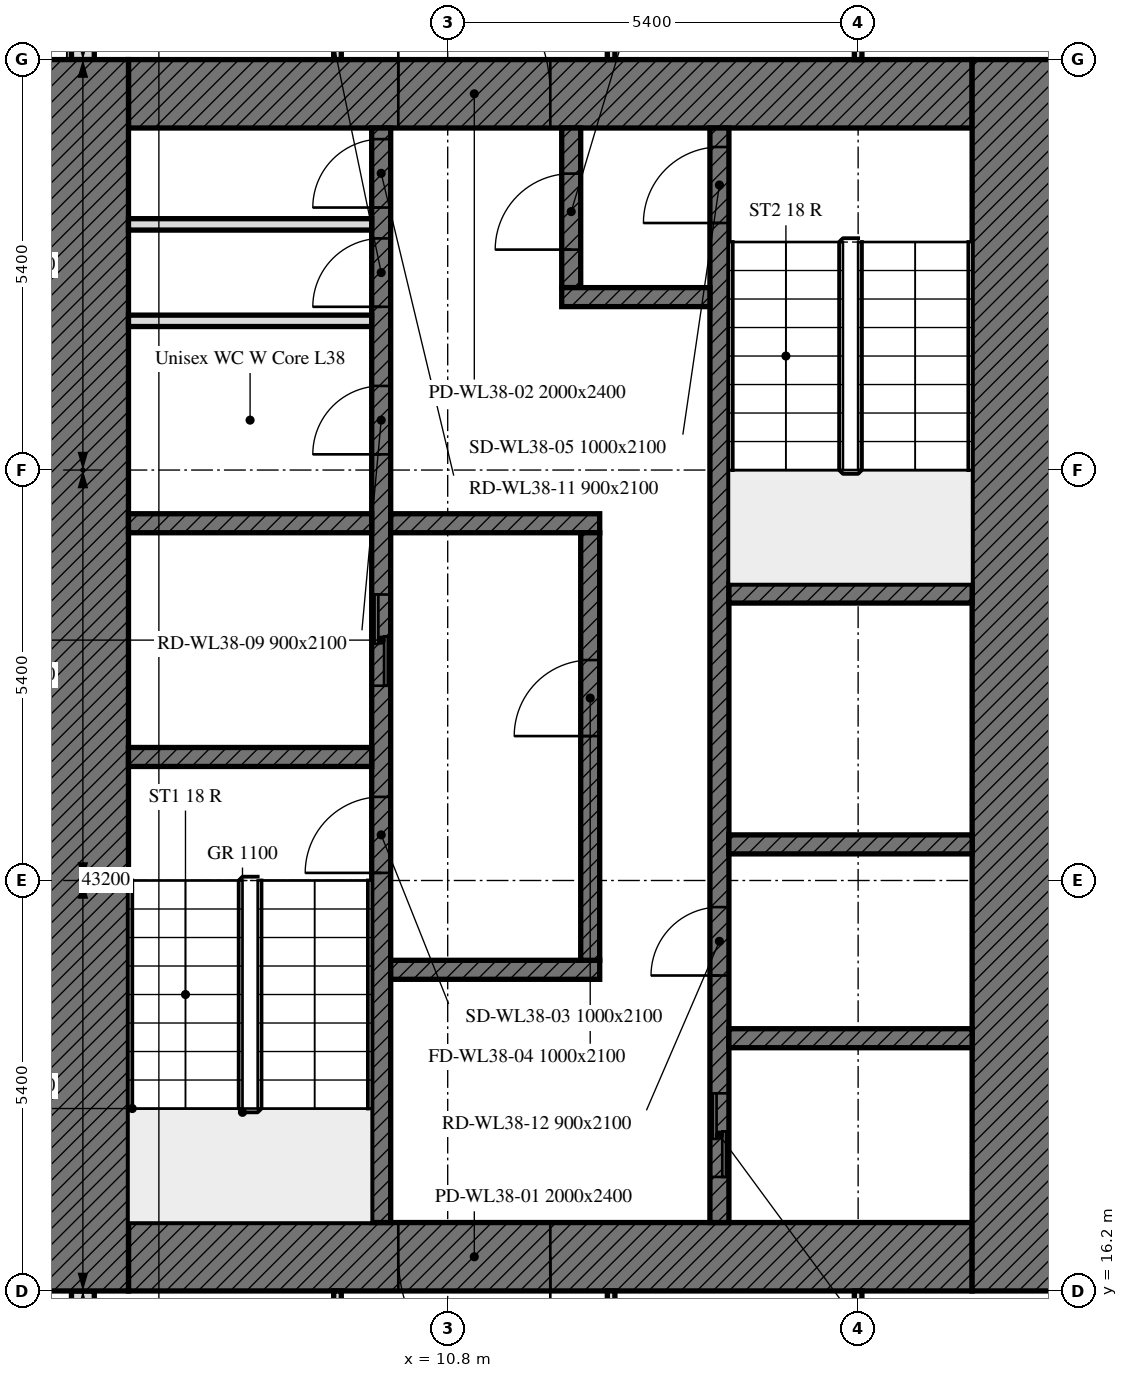
"""IFC4 building model, lengths in metres.
Left out: names, types, materials, properties, quantities, classifications, styles, units other than length and angle.
Written with IfcOpenShell. Run it as: python <this file> out.ifc"""

import sys

from ifc_helpers import new_model, si_unit, direction, frame, frame_2d, origin, place, context, subcontext, project, spatial, rectangle, extrude, element, fill, save


model = new_model("IFC4")
c1 = context("Model", 3, precision=1e-05, world=origin(), true_north=direction((0.0, 1.0)))
c2 = subcontext(c1, "Body", "Model", "MODEL_VIEW")
j1 = project(units=[si_unit("LENGTHUNIT", "METRE"), si_unit("PLANEANGLEUNIT", "RADIAN")], contexts=[c1])
p1 = place(None, origin())
s1 = spatial("IfcSite", under=j1, at=p1, CompositionType="ELEMENT")
p2 = place(p1, origin())
s2 = spatial("IfcBuilding", under=s1, at=p2, CompositionType="ELEMENT")
p3 = place(p2, frame((0.0, 0.0, 162.7)))
s3 = spatial("IfcBuildingStorey", under=s2, at=p3, CompositionType="ELEMENT", Elevation=162.7)
p4 = place(p3, frame((6.0, 37.614, 0.0), z_axis=(0.0, 0.0, 1.0), x_axis=(0.0, -1.0, 0.0)))
e1 = element("IfcWall", 1, at=p4, inside=s3, PredefinedType="SOLIDWALL", context=c2, shape_type="SweptSolid", body=[
    extrude(rectangle(XDim=5.214, YDim=0.3, at=frame_2d((2.607, 0.0))), origin(), (0.0, 0.0, 1.0), 3.0),
])
p5 = place(p4, frame((1.164, 0.0, 0.9)))
e2 = element("IfcOpeningElement", 2, at=p5, cuts=e1, PredefinedType="OPENING", context=c2, shape_type="SweptSolid", body=[
    extrude(rectangle(XDim=1.1, YDim=1.7, at=frame_2d((0.55, 0.85))), frame((0.0, 0.16, 0.0), z_axis=(0.0, -1.0, 0.0), x_axis=(1.0, 0.0, 0.0)), (0.0, 0.0, 1.0), 0.32),
])
p6 = place(p4, frame((2.764, 0.0, 0.9)))
e3 = element("IfcOpeningElement", 3, at=p6, cuts=e1, PredefinedType="OPENING", context=c2, shape_type="SweptSolid", body=[
    extrude(rectangle(XDim=1.1, YDim=1.7, at=frame_2d((0.55, 0.85))), frame((0.0, 0.16, 0.0), z_axis=(0.0, -1.0, 0.0), x_axis=(1.0, 0.0, 0.0)), (0.0, 0.0, 1.0), 0.32),
])
p7 = place(p3, frame((6.0, 16.2, 0.0), z_axis=(0.0, 0.0, 1.0), x_axis=(0.0, -1.0, 0.0)))
e4 = element("IfcWall", 4, at=p7, inside=s3, PredefinedType="SOLIDWALL", context=c2, shape_type="SweptSolid", body=[
    extrude(rectangle(XDim=10.614, YDim=0.3, at=frame_2d((5.307, 0.0))), origin(), (0.0, 0.0, 1.0), 3.0),
])
p8 = place(p7, frame((1.35, 0.0, 0.9)))
e5 = element("IfcOpeningElement", 5, at=p8, cuts=e4, PredefinedType="OPENING", context=c2, shape_type="SweptSolid", body=[
    extrude(rectangle(XDim=1.1, YDim=1.7, at=frame_2d((0.55, 0.85))), frame((0.0, 0.16, 0.0), z_axis=(0.0, -1.0, 0.0), x_axis=(1.0, 0.0, 0.0)), (0.0, 0.0, 1.0), 0.32),
])
p9 = place(p7, frame((2.95, 0.0, 0.9)))
e6 = element("IfcOpeningElement", 6, at=p9, cuts=e4, PredefinedType="OPENING", context=c2, shape_type="SweptSolid", body=[
    extrude(rectangle(XDim=1.1, YDim=1.7, at=frame_2d((0.55, 0.85))), frame((0.0, 0.16, 0.0), z_axis=(0.0, -1.0, 0.0), x_axis=(1.0, 0.0, 0.0)), (0.0, 0.0, 1.0), 0.32),
])
p10 = place(p7, frame((6.75, 0.0, 0.9)))
e7 = element("IfcOpeningElement", 7, at=p10, cuts=e4, PredefinedType="OPENING", context=c2, shape_type="SweptSolid", body=[
    extrude(rectangle(XDim=1.1, YDim=1.7, at=frame_2d((0.55, 0.85))), frame((0.0, 0.16, 0.0), z_axis=(0.0, -1.0, 0.0), x_axis=(1.0, 0.0, 0.0)), (0.0, 0.0, 1.0), 0.32),
])
p11 = place(p7, frame((8.35, 0.0, 0.9)))
e8 = element("IfcOpeningElement", 8, at=p11, cuts=e4, PredefinedType="OPENING", context=c2, shape_type="SweptSolid", body=[
    extrude(rectangle(XDim=1.1, YDim=1.7, at=frame_2d((0.55, 0.85))), frame((0.0, 0.16, 0.0), z_axis=(0.0, -1.0, 0.0), x_axis=(1.0, 0.0, 0.0)), (0.0, 0.0, 1.0), 0.32),
])
p12 = place(p3, frame((17.7, 16.65, 0.0), z_axis=(0.0, 0.0, 1.0), x_axis=(-1.0, 0.0, 0.0)))
e9 = element("IfcWall", 9, at=p12, inside=s3, PredefinedType="SOLIDWALL", context=c2, shape_type="SweptSolid", body=[
    extrude(rectangle(XDim=11.1, YDim=0.9, at=frame_2d((5.55, 0.0))), origin(), (0.0, 0.0, 1.0), 3.0),
])
p13 = place(p12, frame((5.55, 0.0, 0.0)))
e10 = element("IfcOpeningElement", 10, at=p13, cuts=e9, PredefinedType="OPENING", context=c2, shape_type="SweptSolid", body=[
    extrude(rectangle(XDim=2.0, YDim=2.4, at=frame_2d((1.0, 1.2))), frame((0.0, 0.45, 0.0), z_axis=(0.0, -1.0, 0.0), x_axis=(1.0, 0.0, 0.0)), (0.0, 0.0, 1.0), 0.9),
])
p14 = place(p3, frame((6.6, 31.95, 0.0), z_axis=(0.0, 0.0, 1.0), x_axis=(1.0, 0.0, 0.0)))
e11 = element("IfcWall", 11, at=p14, inside=s3, PredefinedType="SOLIDWALL", context=c2, shape_type="SweptSolid", body=[
    extrude(rectangle(XDim=11.1, YDim=0.9, at=frame_2d((5.55, 0.0))), origin(), (0.0, 0.0, 1.0), 3.0),
])
p15 = place(p14, frame((3.55, 0.0, 0.0)))
e12 = element("IfcOpeningElement", 12, at=p15, cuts=e11, PredefinedType="OPENING", context=c2, shape_type="SweptSolid", body=[
    extrude(rectangle(XDim=2.0, YDim=2.4, at=frame_2d((1.0, 1.2))), frame((0.0, 0.45, 0.0), z_axis=(0.0, -1.0, 0.0), x_axis=(1.0, 0.0, 0.0)), (0.0, 0.0, 1.0), 0.9),
])
for number, where, z_axis, x_axis in (
    (13, (6.0, 16.2, 0.0), (0.0, 0.0, 1.0), (0.0, 1.0, 0.0)),
    (14, (18.3, 32.4, 0.0), (0.0, 0.0, 1.0), (0.0, -1.0, 0.0)),
):
    element("IfcWall", number, at=place(p3, frame(where, z_axis=z_axis, x_axis=x_axis)), inside=s3, PredefinedType="SOLIDWALL", context=c2, shape_type="SweptSolid", body=[
        extrude(rectangle(XDim=16.2, YDim=1.2, at=frame_2d((8.1, 0.0))), origin(), (0.0, 0.0, 1.0), 3.0),
    ])
p16 = place(p3, frame((9.925, 17.1, 0.0), z_axis=(0.0, 0.0, 1.0), x_axis=(0.0, 1.0, 0.0)))
e15 = element("IfcWall", 15, at=p16, inside=s3, PredefinedType="SOLIDWALL", context=c2, shape_type="SweptSolid", body=[
    extrude(rectangle(XDim=14.4, YDim=0.25, at=frame_2d((7.2, 0.0))), origin(), (0.0, 0.0, 1.0), 3.0),
])
p17 = place(p16, frame((4.6, 0.0, 0.0)))
e16 = element("IfcOpeningElement", 16, at=p17, cuts=e15, PredefinedType="OPENING", context=c2, shape_type="SweptSolid", body=[
    extrude(rectangle(XDim=1.0, YDim=2.1, at=frame_2d((0.5, 1.05))), frame((0.0, 0.125, 0.0), z_axis=(0.0, -1.0, 0.0), x_axis=(1.0, 0.0, 0.0)), (0.0, 0.0, 1.0), 0.25),
])
p18 = place(p16, frame((7.062, 0.0, 0.0)))
e17 = element("IfcOpeningElement", 17, at=p18, cuts=e15, PredefinedType="OPENING", context=c2, shape_type="SweptSolid", body=[
    extrude(rectangle(XDim=1.2, YDim=2.1, at=frame_2d((0.6, 1.05))), frame((0.0, 0.125, 0.0), z_axis=(0.0, -1.0, 0.0), x_axis=(1.0, 0.0, 0.0)), (0.0, 0.0, 1.0), 0.25),
])
p19 = place(p16, frame((10.106, 0.0, 0.0)))
e18 = element("IfcOpeningElement", 18, at=p19, cuts=e15, PredefinedType="OPENING", context=c2, shape_type="SweptSolid", body=[
    extrude(rectangle(XDim=0.9, YDim=2.1, at=frame_2d((0.45, 1.05))), frame((0.0, 0.125, 0.0), z_axis=(0.0, -1.0, 0.0), x_axis=(1.0, 0.0, 0.0)), (0.0, 0.0, 1.0), 0.25),
])
p20 = place(p16, frame((12.048, 0.0, 0.0)))
e19 = element("IfcOpeningElement", 19, at=p20, cuts=e15, PredefinedType="OPENING", context=c2, shape_type="SweptSolid", body=[
    extrude(rectangle(XDim=0.9, YDim=2.1, at=frame_2d((0.45, 1.05))), frame((0.0, 0.125, 0.0), z_axis=(0.0, -1.0, 0.0), x_axis=(1.0, 0.0, 0.0)), (0.0, 0.0, 1.0), 0.25),
])
p21 = place(p16, frame((13.354, 0.0, 0.0)))
e20 = element("IfcOpeningElement", 20, at=p21, cuts=e15, PredefinedType="OPENING", context=c2, shape_type="SweptSolid", body=[
    extrude(rectangle(XDim=0.9, YDim=2.1, at=frame_2d((0.45, 1.05))), frame((0.0, 0.125, 0.0), z_axis=(0.0, -1.0, 0.0), x_axis=(1.0, 0.0, 0.0)), (0.0, 0.0, 1.0), 0.25),
])
p22 = place(p3, frame((14.375, 17.1, 0.0), z_axis=(0.0, 0.0, 1.0), x_axis=(0.0, 1.0, 0.0)))
e21 = element("IfcWall", 21, at=p22, inside=s3, PredefinedType="SOLIDWALL", context=c2, shape_type="SweptSolid", body=[
    extrude(rectangle(XDim=14.4, YDim=0.25, at=frame_2d((7.2, 0.0))), origin(), (0.0, 0.0, 1.0), 3.0),
])
p23 = place(p22, frame((13.15, 0.0, 0.0)))
e22 = element("IfcOpeningElement", 22, at=p23, cuts=e21, PredefinedType="OPENING", context=c2, shape_type="SweptSolid", body=[
    extrude(rectangle(XDim=1.0, YDim=2.1, at=frame_2d((0.5, 1.05))), frame((0.0, 0.125, 0.0), z_axis=(0.0, -1.0, 0.0), x_axis=(1.0, 0.0, 0.0)), (0.0, 0.0, 1.0), 0.25),
])
p24 = place(p22, frame((0.6, 0.0, 0.0)))
e23 = element("IfcOpeningElement", 23, at=p24, cuts=e21, PredefinedType="OPENING", context=c2, shape_type="SweptSolid", body=[
    extrude(rectangle(XDim=1.1, YDim=2.1, at=frame_2d((0.55, 1.05))), frame((0.0, 0.125, 0.0), z_axis=(0.0, -1.0, 0.0), x_axis=(1.0, 0.0, 0.0)), (0.0, 0.0, 1.0), 0.25),
])
p25 = place(p22, frame((3.25, 0.0, 0.0)))
e24 = element("IfcOpeningElement", 24, at=p25, cuts=e21, PredefinedType="OPENING", context=c2, shape_type="SweptSolid", body=[
    extrude(rectangle(XDim=0.9, YDim=2.1, at=frame_2d((0.45, 1.05))), frame((0.0, 0.125, 0.0), z_axis=(0.0, -1.0, 0.0), x_axis=(1.0, 0.0, 0.0)), (0.0, 0.0, 1.0), 0.25),
])
for number, where, z_axis, x_axis in (
    (25, (6.6, 23.225, 0.0), (0.0, 0.0, 1.0), (1.0, 0.0, 0.0)),
    (26, (14.5, 25.375, 0.0), (0.0, 0.0, 1.0), (1.0, 0.0, 0.0)),
    (27, (14.5, 22.075, 0.0), (0.0, 0.0, 1.0), (1.0, 0.0, 0.0)),
    (28, (6.6, 26.3, 0.0), (0.0, 0.0, 1.0), (1.0, 0.0, 0.0)),
):
    element("IfcWall", number, at=place(p3, frame(where, z_axis=z_axis, x_axis=x_axis)), inside=s3, PredefinedType="SOLIDWALL", context=c2, shape_type="SweptSolid", body=[
        extrude(rectangle(XDim=3.2, YDim=0.25, at=frame_2d((1.6, 0.0))), origin(), (0.0, 0.0, 1.0), 3.0),
    ])
for number, where, z_axis, x_axis in (
    (29, (10.05, 26.3, 0.0), (0.0, 0.0, 1.0), (1.0, 0.0, 0.0)),
    (30, (10.05, 20.425, 0.0), (0.0, 0.0, 1.0), (1.0, 0.0, 0.0)),
):
    element("IfcWall", number, at=place(p3, frame(where, z_axis=z_axis, x_axis=x_axis)), inside=s3, PredefinedType="SOLIDWALL", context=c2, shape_type="SweptSolid", body=[
        extrude(rectangle(XDim=2.75, YDim=0.25, at=frame_2d((1.375, 0.0))), origin(), (0.0, 0.0, 1.0), 3.0),
    ])
p26 = place(p3, frame((12.425, 29.4, 0.0), z_axis=(0.0, 0.0, 1.0), x_axis=(0.0, 1.0, 0.0)))
e31 = element("IfcWall", 31, at=p26, inside=s3, PredefinedType="SOLIDWALL", context=c2, shape_type="SweptSolid", body=[
    extrude(rectangle(XDim=2.1, YDim=0.25, at=frame_2d((1.05, 0.0))), origin(), (0.0, 0.0, 1.0), 3.0),
])
p27 = place(p26, frame((0.5, 0.0, 0.0)))
e32 = element("IfcOpeningElement", 32, at=p27, cuts=e31, PredefinedType="OPENING", context=c2, shape_type="SweptSolid", body=[
    extrude(rectangle(XDim=1.0, YDim=2.1, at=frame_2d((0.5, 1.05))), frame((0.0, 0.125, 0.0), z_axis=(0.0, -1.0, 0.0), x_axis=(1.0, 0.0, 0.0)), (0.0, 0.0, 1.0), 0.25),
])
p28 = place(p3, frame((12.3, 29.275, 0.0), z_axis=(0.0, 0.0, 1.0), x_axis=(1.0, 0.0, 0.0)))
e33 = element("IfcWall", 33, at=p28, inside=s3, PredefinedType="SOLIDWALL", context=c2, shape_type="SweptSolid", body=[
    extrude(rectangle(XDim=1.95, YDim=0.25, at=frame_2d((0.975, 0.0))), origin(), (0.0, 0.0, 1.0), 3.0),
])
p29 = place(p3, frame((12.675, 20.55, 0.0), z_axis=(0.0, 0.0, 1.0), x_axis=(0.0, 1.0, 0.0)))
e34 = element("IfcWall", 34, at=p29, inside=s3, PredefinedType="SOLIDWALL", context=c2, shape_type="SweptSolid", body=[
    extrude(rectangle(XDim=5.625, YDim=0.25, at=frame_2d((2.812, 0.0))), origin(), (0.0, 0.0, 1.0), 3.0),
])
p30 = place(p29, frame((2.95, 0.0, 0.0)))
e35 = element("IfcOpeningElement", 35, at=p30, cuts=e34, PredefinedType="OPENING", context=c2, shape_type="SweptSolid", body=[
    extrude(rectangle(XDim=1.0, YDim=2.1, at=frame_2d((0.5, 1.05))), frame((0.0, 0.125, 0.0), z_axis=(0.0, -1.0, 0.0), x_axis=(1.0, 0.0, 0.0)), (0.0, 0.0, 1.0), 0.25),
])
p31 = place(p3, frame((14.5, 19.525, 0.0), z_axis=(0.0, 0.0, 1.0), x_axis=(1.0, 0.0, 0.0)))
e36 = element("IfcWall", 36, at=p31, inside=s3, PredefinedType="SOLIDWALL", context=c2, shape_type="SweptSolid", body=[
    extrude(rectangle(XDim=3.2, YDim=0.25, at=frame_2d((1.6, 0.0))), origin(), (0.0, 0.0, 1.0), 3.0),
])
for number, where, z_axis, x_axis in (
    (37, (6.6, 28.963, 0.0), (0.0, 0.0, 1.0), (1.0, 0.0, 0.0)),
    (38, (6.6, 30.232, 0.0), (0.0, 0.0, 1.0), (1.0, 0.0, 0.0)),
):
    element("IfcWall", number, at=place(p3, frame(where, z_axis=z_axis, x_axis=x_axis)), inside=s3, PredefinedType="PARTITIONING", context=c2, shape_type="SweptSolid", body=[
        extrude(rectangle(XDim=3.2, YDim=0.15, at=frame_2d((1.6, 0.0))), origin(), (0.0, 0.0, 1.0), 3.0),
    ])
for number, where, z_axis, x_axis in (
    (39, (16.2, 35.025, 0.0), (0.0, 0.0, 1.0), (0.0, -1.0, 0.0)),
    (40, (9.35, 35.025, 0.0), (0.0, 0.0, 1.0), (0.0, -1.0, 0.0)),
    (41, (12.95, 32.4, 0.0), (0.0, 0.0, 1.0), (0.0, 1.0, 0.0)),
):
    element("IfcWall", number, at=place(p3, frame(where, z_axis=z_axis, x_axis=x_axis)), inside=s3, PredefinedType="PARTITIONING", context=c2, shape_type="SweptSolid", body=[
        extrude(rectangle(XDim=2.625, YDim=0.1, at=frame_2d((1.312, 0.0))), origin(), (0.0, 0.0, 1.0), 3.0),
    ])
p32 = place(p3, frame((16.2, 16.2, 0.0), z_axis=(0.0, 0.0, 1.0), x_axis=(0.0, -1.0, 0.0)))
e42 = element("IfcWall", 42, at=p32, inside=s3, PredefinedType="PARTITIONING", context=c2, shape_type="SweptSolid", body=[
    extrude(rectangle(XDim=4.955, YDim=0.1, at=frame_2d((2.478, 0.0))), origin(), (0.0, 0.0, 1.0), 2.4),
])
for number, where, z_axis, x_axis in (
    (43, (9.35, 16.2, 0.0), (0.0, 0.0, 1.0), (0.0, -1.0, 0.0)),
    (44, (12.95, 8.175, 0.0), (0.0, 0.0, 1.0), (0.0, 1.0, 0.0)),
):
    element("IfcWall", number, at=place(p3, frame(where, z_axis=z_axis, x_axis=x_axis)), inside=s3, PredefinedType="PARTITIONING", context=c2, shape_type="SweptSolid", body=[
        extrude(rectangle(XDim=8.025, YDim=0.1, at=frame_2d((4.012, 0.0))), origin(), (0.0, 0.0, 1.0), 3.0),
    ])
p33 = place(p13, origin())
e45 = element("IfcDoor", 45, at=p33, inside=s3, OperationType="DOUBLE_DOOR_SINGLE_SWING", PredefinedType="DOOR", context=c2, shape_type="SweptSolid", body=[
    extrude(rectangle(XDim=2.0, YDim=2.4, at=frame_2d((1.0, 1.2))), frame((0.0, 0.025, 0.0), z_axis=(0.0, -1.0, 0.0), x_axis=(1.0, 0.0, 0.0)), (0.0, 0.0, 1.0), 0.05),
])
fill(e10, e45)
p34 = place(p15, origin())
e46 = element("IfcDoor", 46, at=p34, inside=s3, OperationType="DOUBLE_DOOR_SINGLE_SWING", PredefinedType="DOOR", context=c2, shape_type="SweptSolid", body=[
    extrude(rectangle(XDim=2.0, YDim=2.4, at=frame_2d((1.0, 1.2))), frame((0.0, 0.025, 0.0), z_axis=(0.0, -1.0, 0.0), x_axis=(1.0, 0.0, 0.0)), (0.0, 0.0, 1.0), 0.05),
])
fill(e12, e46)
p35 = place(p17, origin())
e47 = element("IfcDoor", 47, at=p35, inside=s3, OperationType="SINGLE_SWING_LEFT", PredefinedType="DOOR", context=c2, shape_type="SweptSolid", body=[
    extrude(rectangle(XDim=1.0, YDim=2.1, at=frame_2d((0.5, 1.05))), frame((0.0, 0.025, 0.0), z_axis=(0.0, -1.0, 0.0), x_axis=(1.0, 0.0, 0.0)), (0.0, 0.0, 1.0), 0.05),
])
fill(e16, e47)
p36 = place(p30, origin())
e48 = element("IfcDoor", 48, at=p36, inside=s3, OperationType="SINGLE_SWING_LEFT", PredefinedType="DOOR", context=c2, shape_type="SweptSolid", body=[
    extrude(rectangle(XDim=1.0, YDim=2.1, at=frame_2d((0.5, 1.05))), frame((0.0, 0.025, 0.0), z_axis=(0.0, -1.0, 0.0), x_axis=(1.0, 0.0, 0.0)), (0.0, 0.0, 1.0), 0.05),
])
fill(e35, e48)
p37 = place(p23, origin())
e49 = element("IfcDoor", 49, at=p37, inside=s3, OperationType="SINGLE_SWING_LEFT", PredefinedType="DOOR", context=c2, shape_type="SweptSolid", body=[
    extrude(rectangle(XDim=1.0, YDim=2.1, at=frame_2d((0.5, 1.05))), frame((0.0, 0.025, 0.0), z_axis=(0.0, -1.0, 0.0), x_axis=(1.0, 0.0, 0.0)), (0.0, 0.0, 1.0), 0.05),
])
fill(e22, e49)
p38 = place(p27, origin())
e50 = element("IfcDoor", 50, at=p38, inside=s3, OperationType="SINGLE_SWING_LEFT", PredefinedType="DOOR", context=c2, shape_type="SweptSolid", body=[
    extrude(rectangle(XDim=1.0, YDim=2.1, at=frame_2d((0.5, 1.05))), frame((0.0, 0.025, 0.0), z_axis=(0.0, -1.0, 0.0), x_axis=(1.0, 0.0, 0.0)), (0.0, 0.0, 1.0), 0.05),
])
fill(e32, e50)
p39 = place(p18, origin())
e51 = element("IfcDoor", 51, at=p39, inside=s3, OperationType="DOUBLE_DOOR_SLIDING", PredefinedType="DOOR", context=c2, shape_type="SweptSolid", body=[
    extrude(rectangle(XDim=1.2, YDim=2.1, at=frame_2d((0.6, 1.05))), frame((0.0, 0.025, 0.0), z_axis=(0.0, -1.0, 0.0), x_axis=(1.0, 0.0, 0.0)), (0.0, 0.0, 1.0), 0.05),
])
fill(e17, e51)
p40 = place(p24, origin())
e52 = element("IfcDoor", 52, at=p40, inside=s3, OperationType="DOUBLE_DOOR_SLIDING", PredefinedType="DOOR", context=c2, shape_type="SweptSolid", body=[
    extrude(rectangle(XDim=1.1, YDim=2.1, at=frame_2d((0.55, 1.05))), frame((0.0, 0.025, 0.0), z_axis=(0.0, -1.0, 0.0), x_axis=(1.0, 0.0, 0.0)), (0.0, 0.0, 1.0), 0.05),
])
fill(e23, e52)
p41 = place(p19, origin())
e53 = element("IfcDoor", 53, at=p41, inside=s3, OperationType="SINGLE_SWING_LEFT", PredefinedType="DOOR", context=c2, shape_type="SweptSolid", body=[
    extrude(rectangle(XDim=0.9, YDim=2.1, at=frame_2d((0.45, 1.05))), frame((0.0, 0.025, 0.0), z_axis=(0.0, -1.0, 0.0), x_axis=(1.0, 0.0, 0.0)), (0.0, 0.0, 1.0), 0.05),
])
fill(e18, e53)
p42 = place(p20, origin())
e54 = element("IfcDoor", 54, at=p42, inside=s3, OperationType="SINGLE_SWING_LEFT", PredefinedType="DOOR", context=c2, shape_type="SweptSolid", body=[
    extrude(rectangle(XDim=0.9, YDim=2.1, at=frame_2d((0.45, 1.05))), frame((0.0, 0.025, 0.0), z_axis=(0.0, -1.0, 0.0), x_axis=(1.0, 0.0, 0.0)), (0.0, 0.0, 1.0), 0.05),
])
fill(e19, e54)
p43 = place(p21, origin())
e55 = element("IfcDoor", 55, at=p43, inside=s3, OperationType="SINGLE_SWING_LEFT", PredefinedType="DOOR", context=c2, shape_type="SweptSolid", body=[
    extrude(rectangle(XDim=0.9, YDim=2.1, at=frame_2d((0.45, 1.05))), frame((0.0, 0.025, 0.0), z_axis=(0.0, -1.0, 0.0), x_axis=(1.0, 0.0, 0.0)), (0.0, 0.0, 1.0), 0.05),
])
fill(e20, e55)
p44 = place(p25, origin())
e56 = element("IfcDoor", 56, at=p44, inside=s3, OperationType="SINGLE_SWING_LEFT", PredefinedType="DOOR", context=c2, shape_type="SweptSolid", body=[
    extrude(rectangle(XDim=0.9, YDim=2.1, at=frame_2d((0.45, 1.05))), frame((0.0, 0.025, 0.0), z_axis=(0.0, -1.0, 0.0), x_axis=(1.0, 0.0, 0.0)), (0.0, 0.0, 1.0), 0.05),
])
fill(e24, e56)
save(model, sys.argv[1])
